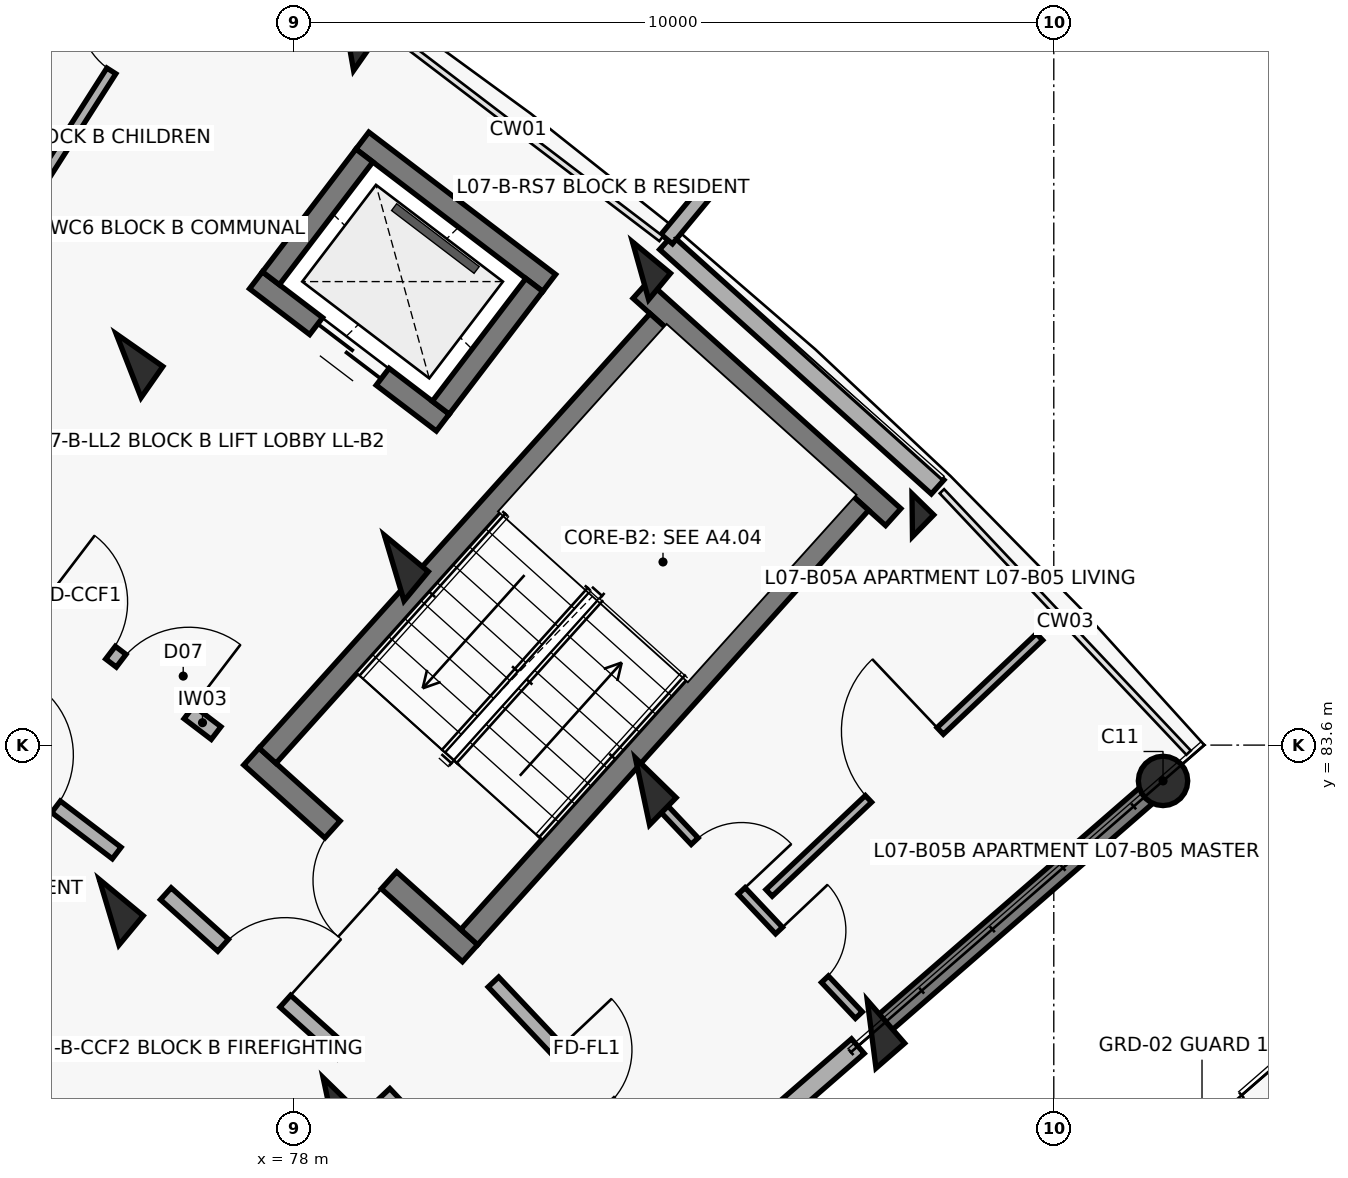
"""IFC4 building model, lengths in metres.
Left out: names, types, materials, properties, quantities, classifications, styles, units other than length and angle.
Written with IfcOpenShell. Run it as: python <this file> out.ifc"""

import sys

from ifc_helpers import new_model, si_unit, direction, frame, frame_2d, origin, origin_2d, place, context, subcontext, project, spatial, rectangle, circle, extrude, element, fill, save


model = new_model("IFC4")
c1 = context("Model", 3, precision=1e-05, world=origin(), true_north=direction((0.0, 1.0)))
c2 = subcontext(c1, "Body", "Model", "MODEL_VIEW")
j1 = project(units=[si_unit("LENGTHUNIT", "METRE"), si_unit("PLANEANGLEUNIT", "RADIAN")], contexts=[c1])
p1 = place(None, origin())
s1 = spatial("IfcSite", under=j1, at=p1, CompositionType="ELEMENT")
p2 = place(p1, origin())
s2 = spatial("IfcBuilding", under=s1, at=p2, CompositionType="ELEMENT")
p3 = place(p2, frame((0.0, 0.0, 23.6)))
s3 = spatial("IfcBuildingStorey", under=s2, at=p3, CompositionType="ELEMENT", Elevation=23.6)
p4 = place(p3, frame((75.828, 88.592, 0.0), z_axis=(0.0, 0.0, 1.0), x_axis=(0.573004420611, 0.819552276527, 0.0)))
e1 = element("IfcColumn", 1, at=p4, inside=s3, PredefinedType="COLUMN", context=c2, shape_type="SweptSolid", body=[
    extrude(rectangle(XDim=0.5, YDim=0.75, at=origin_2d()), origin(), (0.0, 0.0, 1.0), 3.1),
])
p5 = place(p3, frame((78.739, 92.755, 0.0), z_axis=(0.0, 0.0, 1.0), x_axis=(0.573004420611, 0.819552276527, 0.0)))
e2 = element("IfcColumn", 2, at=p5, inside=s3, PredefinedType="COLUMN", context=c2, shape_type="SweptSolid", body=[
    extrude(rectangle(XDim=0.4, YDim=0.4, at=origin_2d()), origin(), (0.0, 0.0, 1.0), 3.1),
])
for number, where, z_axis, x_axis in (
    (3, (75.571, 81.402, 0.0), (0.0, 0.0, 1.0), (0.638, 0.77, 0.0)),
    (4, (79.322, 85.93, 0.0), (0.0, 0.0, 1.0), (0.638, 0.77, 0.0)),
):
    element("IfcColumn", number, at=place(p3, frame(where, z_axis=z_axis, x_axis=x_axis)), inside=s3, PredefinedType="COLUMN", context=c2, shape_type="SweptSolid", body=[
        extrude(rectangle(XDim=0.5, YDim=0.75, at=origin_2d()), origin(), (0.0, 0.0, 1.0), 3.1),
    ])
p6 = place(p3, frame((82.563, 89.842, 0.0), z_axis=(0.0, 0.0, 1.0), x_axis=(0.637961754089, 0.770068049148, 0.0)))
e5 = element("IfcColumn", 5, at=p6, inside=s3, PredefinedType="COLUMN", context=c2, shape_type="SweptSolid", body=[
    extrude(rectangle(XDim=0.45, YDim=0.65, at=origin_2d()), origin(), (0.0, 0.0, 1.0), 3.1),
])
for number, where, z_axis, x_axis in (
    (6, (78.48, 78.784, 0.0), (0.0, 0.0, 1.0), (0.699, 0.715, 0.0)),
    (7, (82.588, 82.991, 0.0), (0.0, 0.0, 1.0), (0.699, 0.715, 0.0)),
):
    element("IfcColumn", number, at=place(p3, frame(where, z_axis=z_axis, x_axis=x_axis)), inside=s3, PredefinedType="COLUMN", context=c2, shape_type="SweptSolid", body=[
        extrude(rectangle(XDim=0.5, YDim=0.75, at=origin_2d()), origin(), (0.0, 0.0, 1.0), 3.1),
    ])
p7 = place(p3, frame((86.137, 86.626, 0.0), z_axis=(0.0, 0.0, 1.0), x_axis=(0.698665066769, 0.715448897181, 0.0)))
e8 = element("IfcColumn", 8, at=p7, inside=s3, PredefinedType="COLUMN", context=c2, shape_type="SweptSolid", body=[
    extrude(rectangle(XDim=0.4, YDim=0.4, at=origin_2d()), origin(), (0.0, 0.0, 1.0), 3.1),
])
p8 = place(p3, frame((85.603, 79.796, 0.0), z_axis=(0.0, 0.0, 1.0), x_axis=(0.754709580223, 0.656059028991, 0.0)))
e9 = element("IfcColumn", 9, at=p8, inside=s3, PredefinedType="COLUMN", context=c2, shape_type="SweptSolid", body=[
    extrude(rectangle(XDim=0.5, YDim=0.75, at=origin_2d()), origin(), (0.0, 0.0, 1.0), 3.1),
])
p9 = place(p3, frame((89.437, 83.129, 0.0), z_axis=(0.0, 0.0, 1.0), x_axis=(0.754709580223, 0.656059028991, 0.0)))
e10 = element("IfcColumn", 10, at=p9, inside=s3, PredefinedType="COLUMN", context=c2, shape_type="SweptSolid", body=[
    extrude(circle(Radius=0.325, at=origin_2d()), origin(), (0.0, 0.0, 1.0), 3.1),
])
p10 = place(p3, frame((85.739, 79.914, 0.0), z_axis=(0.0, 0.0, 1.0), x_axis=(0.754703505217, 0.65606601742, 0.0)))
e11 = element("IfcWall", 11, at=p10, inside=s3, PredefinedType="SHEAR", context=c2, shape_type="SweptSolid", body=[
    extrude(rectangle(XDim=4.72, YDim=0.27, at=frame_2d((2.36, 0.0))), origin(), (0.0, 0.0, 1.0), 2.86),
])
p11 = place(p3, frame((82.897, 90.213, 0.0), z_axis=(0.0, 0.0, 1.0), x_axis=(0.743387539862, -0.668860946369, 0.0)))
e12 = element("IfcWall", 12, at=p11, inside=s3, PredefinedType="SOLIDWALL", context=c2, shape_type="SweptSolid", body=[
    extrude(rectangle(XDim=4.809, YDim=0.248, at=frame_2d((2.405, 0.0))), origin(), (0.0, 0.0, 1.0), 2.25),
])
p12 = place(p3, frame((82.908, 90.257, 0.0), z_axis=(0.0, 0.0, 1.0), x_axis=(0.637967316825, 0.770063440674, 0.0)))
e13 = element("IfcWall", 13, at=p12, inside=s3, PredefinedType="PARAPET", context=c2, shape_type="SweptSolid", body=[
    extrude(rectangle(XDim=0.9, YDim=0.195, at=frame_2d((0.45, 0.0))), origin(), (0.0, 0.0, 1.0), 2.25),
])
p13 = place(p3, frame((79.234, 74.259, 0.0), z_axis=(0.0, 0.0, 1.0), x_axis=(0.754717680958, 0.656049710044, 0.0)))
e14 = element("IfcWall", 14, at=p13, inside=s3, PredefinedType="SOLIDWALL", context=c2, shape_type="SweptSolid", body=[
    extrude(rectangle(XDim=8.2, YDim=0.255, at=frame_2d((4.1, 0.0))), origin(), (0.0, 0.0, 1.0), 2.18),
])
p14 = place(p13, frame((3.59, 0.0, 0.75)))
e15 = element("IfcOpeningElement", 15, at=p14, cuts=e14, PredefinedType="OPENING", context=c2, shape_type="SweptSolid", body=[
    extrude(rectangle(XDim=1.35, YDim=1.35, at=frame_2d((0.675, 0.675))), frame((0.0, 0.137, 0.0), z_axis=(0.0, -1.0, 0.0), x_axis=(1.0, 0.0, 0.0)), (0.0, 0.0, 1.0), 0.275),
])
p15 = place(p3, frame((80.32, 80.862, 0.0), z_axis=(0.0, 0.0, 1.0), x_axis=(-0.743375696158, 0.668874109501, 0.0)))
e16 = element("IfcWall", 16, at=p15, inside=s3, PredefinedType="SHEAR", context=c2, shape_type="SweptSolid", body=[
    extrude(rectangle(XDim=3.87, YDim=0.3, at=frame_2d((1.935, 0.0))), origin(), (0.0, 0.0, 1.0), 3.1),
])
p16 = place(p15, frame((1.435, 0.0, 0.0)))
e17 = element("IfcOpeningElement", 17, at=p16, cuts=e16, PredefinedType="OPENING", context=c2, shape_type="SweptSolid", body=[
    extrude(rectangle(XDim=1.0, YDim=2.15, at=frame_2d((0.5, 1.075))), frame((0.0, 0.16, 0.0), z_axis=(0.0, -1.0, 0.0), x_axis=(1.0, 0.0, 0.0)), (0.0, 0.0, 1.0), 0.32),
])
p17 = place(p3, frame((85.887, 86.601, 0.0), z_axis=(0.0, 0.0, 1.0), x_axis=(-0.743400052815, 0.668847038922, 0.0)))
e18 = element("IfcWall", 18, at=p17, inside=s3, PredefinedType="SHEAR", context=c2, shape_type="SweptSolid", body=[
    extrude(rectangle(XDim=4.47, YDim=0.3, at=frame_2d((2.235, 0.0))), origin(), (0.0, 0.0, 1.0), 3.1),
])
p18 = place(p3, frame((80.309, 81.073, 0.0), z_axis=(0.0, 0.0, 1.0), x_axis=(0.668885797871, 0.743365179038, 0.0)))
e19 = element("IfcWall", 19, at=p18, inside=s3, PredefinedType="SHEAR", context=c2, shape_type="SweptSolid", body=[
    extrude(rectangle(XDim=7.69, YDim=0.3, at=frame_2d((3.845, 0.0))), origin(), (0.0, 0.0, 1.0), 3.1),
])
p19 = place(p3, frame((77.655, 83.461, 0.0), z_axis=(0.0, 0.0, 1.0), x_axis=(0.668868253964, 0.743380964808, 0.0)))
e20 = element("IfcWall", 20, at=p19, inside=s3, PredefinedType="SHEAR", context=c2, shape_type="SweptSolid", body=[
    extrude(rectangle(XDim=7.69, YDim=0.3, at=frame_2d((3.845, 0.0))), origin(), (0.0, 0.0, 1.0), 3.1),
])
p20 = place(p3, frame((79.961, 87.844, 0.0), z_axis=(0.0, 0.0, 1.0), x_axis=(-0.795464365424, 0.606000365793, 0.0)))
e21 = element("IfcWall", 21, at=p20, inside=s3, PredefinedType="SHEAR", context=c2, shape_type="SweptSolid", body=[
    extrude(rectangle(XDim=3.09, YDim=0.28, at=frame_2d((1.545, 0.0))), origin(), (0.0, 0.0, 1.0), 3.1),
])
p21 = place(p20, frame((0.995, 0.0, 0.0)))
e22 = element("IfcOpeningElement", 22, at=p21, cuts=e21, PredefinedType="OPENING", context=c2, shape_type="SweptSolid", body=[
    extrude(rectangle(XDim=1.1, YDim=2.15, at=frame_2d((0.55, 1.075))), frame((0.0, 0.15, 0.0), z_axis=(0.0, -1.0, 0.0), x_axis=(1.0, 0.0, 0.0)), (0.0, 0.0, 1.0), 0.3),
])
p22 = place(p3, frame((81.361, 89.681, 0.0), z_axis=(0.0, 0.0, 1.0), x_axis=(-0.795502452183, 0.605950368076, 0.0)))
e23 = element("IfcWall", 23, at=p22, inside=s3, PredefinedType="SHEAR", context=c2, shape_type="SweptSolid", body=[
    extrude(rectangle(XDim=3.09, YDim=0.28, at=frame_2d((1.545, 0.0))), origin(), (0.0, 0.0, 1.0), 3.1),
])
for number, where, z_axis, x_axis in (
    (24, (79.935, 88.04, 0.0), (0.0, 0.0, 1.0), (0.606, 0.795, 0.0)),
    (25, (77.699, 89.743, 0.0), (0.0, 0.0, 1.0), (0.606, 0.795, 0.0)),
):
    element("IfcWall", number, at=place(p3, frame(where, z_axis=z_axis, x_axis=x_axis)), inside=s3, PredefinedType="SHEAR", context=c2, shape_type="SweptSolid", body=[
        extrude(rectangle(XDim=2.03, YDim=0.28, at=frame_2d((1.015, 0.0))), origin(), (0.0, 0.0, 1.0), 3.1),
    ])
p23 = place(p3, frame((72.347, 87.37, 0.0), z_axis=(0.0, 0.0, 1.0), x_axis=(0.537777309481, 0.843086926365, 0.0)))
e26 = element("IfcWall", 26, at=p23, inside=s3, PredefinedType="PARTITIONING", context=c2, shape_type="SweptSolid", body=[
    extrude(rectangle(XDim=7.95, YDim=0.14, at=frame_2d((3.975, 0.0))), origin(), (0.0, 0.0, 1.0), 2.08),
])
p24 = place(p23, frame((6.05, 0.0, 0.0)))
e27 = element("IfcOpeningElement", 27, at=p24, cuts=e26, PredefinedType="OPENING", context=c2, shape_type="SweptSolid", body=[
    extrude(rectangle(XDim=0.92, YDim=2.1, at=frame_2d((0.46, 1.05))), frame((0.0, 0.08, 0.0), z_axis=(0.0, -1.0, 0.0), x_axis=(1.0, 0.0, 0.0)), (0.0, 0.0, 1.0), 0.16),
])
p25 = place(p3, frame((74.357, 85.756, 0.0), z_axis=(0.0, 0.0, 1.0), x_axis=(0.795498026433, -0.605956178235, 0.0)))
e28 = element("IfcWall", 28, at=p25, inside=s3, PredefinedType="SOLIDWALL", context=c2, shape_type="SweptSolid", body=[
    extrude(rectangle(XDim=3.296, YDim=0.21, at=frame_2d((1.648, 0.0))), origin(), (0.0, 0.0, 1.0), 2.08),
])
p26 = place(p25, frame((0.45, 0.0, 0.0)))
e29 = element("IfcOpeningElement", 29, at=p26, cuts=e28, PredefinedType="OPENING", context=c2, shape_type="SweptSolid", body=[
    extrude(rectangle(XDim=1.1, YDim=2.15, at=frame_2d((0.55, 1.075))), frame((0.0, 0.115, 0.0), z_axis=(0.0, -1.0, 0.0), x_axis=(1.0, 0.0, 0.0)), (0.0, 0.0, 1.0), 0.23),
])
p27 = place(p25, frame((1.726, 0.0, 0.0)))
e30 = element("IfcOpeningElement", 30, at=p27, cuts=e28, PredefinedType="OPENING", context=c2, shape_type="SweptSolid", body=[
    extrude(rectangle(XDim=1.12, YDim=2.15, at=frame_2d((0.56, 1.075))), frame((0.0, 0.115, 0.0), z_axis=(0.0, -1.0, 0.0), x_axis=(1.0, 0.0, 0.0)), (0.0, 0.0, 1.0), 0.23),
])
p28 = place(p3, frame((73.182, 84.076, 0.0), z_axis=(0.0, 0.0, 1.0), x_axis=(0.795501577908, -0.605951515838, 0.0)))
e31 = element("IfcWall", 31, at=p28, inside=s3, PredefinedType="SOLIDWALL", context=c2, shape_type="SweptSolid", body=[
    extrude(rectangle(XDim=3.129, YDim=0.19, at=frame_2d((1.564, 0.0))), origin(), (0.0, 0.0, 1.0), 2.08),
])
p29 = place(p28, frame((1.004, 0.0, 0.0)))
e32 = element("IfcOpeningElement", 32, at=p29, cuts=e31, PredefinedType="OPENING", context=c2, shape_type="SweptSolid", body=[
    extrude(rectangle(XDim=1.12, YDim=2.15, at=frame_2d((0.56, 1.075))), frame((0.0, 0.105, 0.0), z_axis=(0.0, -1.0, 0.0), x_axis=(1.0, 0.0, 0.0)), (0.0, 0.0, 1.0), 0.21),
])
p30 = place(p3, frame((76.317, 81.644, 0.0), z_axis=(0.0, 0.0, 1.0), x_axis=(0.743387266925, -0.668861249718, 0.0)))
e33 = element("IfcWall", 33, at=p30, inside=s3, PredefinedType="SOLIDWALL", context=c2, shape_type="SweptSolid", body=[
    extrude(rectangle(XDim=3.128, YDim=0.21, at=frame_2d((1.564, 0.0))), origin(), (0.0, 0.0, 1.0), 2.08),
])
p31 = place(p30, frame((1.014, 0.0, 0.0)))
e34 = element("IfcOpeningElement", 34, at=p31, cuts=e33, PredefinedType="OPENING", context=c2, shape_type="SweptSolid", body=[
    extrude(rectangle(XDim=1.1, YDim=2.15, at=frame_2d((0.55, 1.075))), frame((0.0, 0.115, 0.0), z_axis=(0.0, -1.0, 0.0), x_axis=(1.0, 0.0, 0.0)), (0.0, 0.0, 1.0), 0.23),
])
p32 = place(p3, frame((80.628, 80.483, 0.0), z_axis=(0.0, 0.0, 1.0), x_axis=(0.686310507227, -0.727308660522, 0.0)))
e35 = element("IfcWall", 35, at=p32, inside=s3, PredefinedType="SOLIDWALL", context=c2, shape_type="SweptSolid", body=[
    extrude(rectangle(XDim=3.436, YDim=0.19, at=frame_2d((1.718, 0.0))), origin(), (0.0, 0.0, 1.0), 2.08),
])
p33 = place(p32, frame((1.228, 0.0, 0.0)))
e36 = element("IfcOpeningElement", 36, at=p33, cuts=e35, PredefinedType="OPENING", context=c2, shape_type="SweptSolid", body=[
    extrude(rectangle(XDim=0.98, YDim=2.15, at=frame_2d((0.49, 1.075))), frame((0.0, 0.105, 0.0), z_axis=(0.0, -1.0, 0.0), x_axis=(1.0, 0.0, 0.0)), (0.0, 0.0, 1.0), 0.21),
])
p34 = place(p3, frame((79.195, 79.016, 0.0), z_axis=(0.0, 0.0, 1.0), x_axis=(0.686307658735, -0.727311348434, 0.0)))
e37 = element("IfcWall", 37, at=p34, inside=s3, PredefinedType="SOLIDWALL", context=c2, shape_type="SweptSolid", body=[
    extrude(rectangle(XDim=3.269, YDim=0.19, at=frame_2d((1.634, 0.0))), origin(), (0.0, 0.0, 1.0), 2.08),
])
p35 = place(p34, frame((1.184, 0.0, 0.0)))
e38 = element("IfcOpeningElement", 38, at=p35, cuts=e37, PredefinedType="OPENING", context=c2, shape_type="SweptSolid", body=[
    extrude(rectangle(XDim=0.9, YDim=2.1, at=frame_2d((0.45, 1.05))), frame((0.0, 0.105, 0.0), z_axis=(0.0, -1.0, 0.0), x_axis=(1.0, 0.0, 0.0)), (0.0, 0.0, 1.0), 0.21),
])
p36 = place(p3, frame((82.829, 82.809, 0.0), z_axis=(0.0, 0.0, 1.0), x_axis=(0.686300649561, -0.727317962388, 0.0)))
e39 = element("IfcWall", 39, at=p36, inside=s3, PredefinedType="PARTITIONING", context=c2, shape_type="SweptSolid", body=[
    extrude(rectangle(XDim=3.797, YDim=0.125, at=frame_2d((1.899, 0.0))), origin(), (0.0, 0.0, 1.0), 2.08),
])
p37 = place(p36, frame((0.65, 0.0, 0.0)))
e40 = element("IfcOpeningElement", 40, at=p37, cuts=e39, PredefinedType="OPENING", context=c2, shape_type="SweptSolid", body=[
    extrude(rectangle(XDim=0.9, YDim=2.1, at=frame_2d((0.45, 1.05))), frame((0.0, 0.073, 0.0), z_axis=(0.0, -1.0, 0.0), x_axis=(1.0, 0.0, 0.0)), (0.0, 0.0, 1.0), 0.145),
])
p38 = place(p36, frame((2.267, 0.0, 0.0)))
e41 = element("IfcOpeningElement", 41, at=p38, cuts=e39, PredefinedType="OPENING", context=c2, shape_type="SweptSolid", body=[
    extrude(rectangle(XDim=0.88, YDim=2.1, at=frame_2d((0.44, 1.05))), frame((0.0, 0.073, 0.0), z_axis=(0.0, -1.0, 0.0), x_axis=(1.0, 0.0, 0.0)), (0.0, 0.0, 1.0), 0.145),
])
p39 = place(p3, frame((84.254, 81.655, 0.0), z_axis=(0.0, 0.0, 1.0), x_axis=(0.726295620759, 0.687382478149, 0.0)))
e42 = element("IfcWall", 42, at=p39, inside=s3, PredefinedType="PARTITIONING", context=c2, shape_type="SweptSolid", body=[
    extrude(rectangle(XDim=4.9, YDim=0.12, at=frame_2d((2.45, 0.0))), origin(), (0.0, 0.0, 1.0), 2.08),
])
p40 = place(p39, frame((1.8, 0.0, 0.0)))
e43 = element("IfcOpeningElement", 43, at=p40, cuts=e42, PredefinedType="OPENING", context=c2, shape_type="SweptSolid", body=[
    extrude(rectangle(XDim=1.3, YDim=2.1, at=frame_2d((0.65, 1.05))), frame((0.0, 0.07, 0.0), z_axis=(0.0, -1.0, 0.0), x_axis=(1.0, 0.0, 0.0)), (0.0, 0.0, 1.0), 0.14),
])
p41 = place(p16, origin())
e44 = element("IfcDoor", 44, at=p41, inside=s3, OperationType="SINGLE_SWING_LEFT", PredefinedType="DOOR", context=c2, shape_type="SweptSolid", body=[
    extrude(rectangle(XDim=1.0, YDim=2.15, at=frame_2d((0.5, 1.075))), frame((0.0, 0.025, 0.0), z_axis=(0.0, -1.0, 0.0), x_axis=(1.0, 0.0, 0.0)), (0.0, 0.0, 1.0), 0.05),
])
fill(e17, e44)
p42 = place(p21, origin())
e45 = element("IfcDoor", 45, at=p42, inside=s3, OperationType="DOUBLE_DOOR_SLIDING", PredefinedType="DOOR", context=c2, shape_type="SweptSolid", body=[
    extrude(rectangle(XDim=1.1, YDim=2.15, at=frame_2d((0.55, 1.075))), frame((0.0, 0.025, 0.0), z_axis=(0.0, -1.0, 0.0), x_axis=(1.0, 0.0, 0.0)), (0.0, 0.0, 1.0), 0.05),
])
fill(e22, e45)
p43 = place(p24, origin())
e46 = element("IfcDoor", 46, at=p43, inside=s3, OperationType="SINGLE_SWING_RIGHT", PredefinedType="DOOR", context=c2, shape_type="SweptSolid", body=[
    extrude(rectangle(XDim=0.92, YDim=2.1, at=frame_2d((0.46, 1.05))), frame((0.0, 0.025, 0.0), z_axis=(0.0, -1.0, 0.0), x_axis=(1.0, 0.0, 0.0)), (0.0, 0.0, 1.0), 0.05),
])
fill(e27, e46)
p44 = place(p26, origin())
e47 = element("IfcDoor", 47, at=p44, inside=s3, OperationType="SINGLE_SWING_LEFT", PredefinedType="DOOR", context=c2, shape_type="SweptSolid", body=[
    extrude(rectangle(XDim=1.1, YDim=2.15, at=frame_2d((0.55, 1.075))), frame((0.0, 0.025, 0.0), z_axis=(0.0, -1.0, 0.0), x_axis=(1.0, 0.0, 0.0)), (0.0, 0.0, 1.0), 0.05),
])
fill(e29, e47)
p45 = place(p27, origin())
e48 = element("IfcDoor", 48, at=p45, inside=s3, OperationType="SINGLE_SWING_RIGHT", PredefinedType="DOOR", context=c2, shape_type="SweptSolid", body=[
    extrude(rectangle(XDim=1.12, YDim=2.15, at=frame_2d((0.56, 1.075))), frame((0.0, 0.025, 0.0), z_axis=(0.0, -1.0, 0.0), x_axis=(1.0, 0.0, 0.0)), (0.0, 0.0, 1.0), 0.05),
])
fill(e30, e48)
p46 = place(p29, origin())
e49 = element("IfcDoor", 49, at=p46, inside=s3, OperationType="SINGLE_SWING_LEFT", PredefinedType="DOOR", context=c2, shape_type="SweptSolid", body=[
    extrude(rectangle(XDim=1.12, YDim=2.15, at=frame_2d((0.56, 1.075))), frame((0.0, 0.025, 0.0), z_axis=(0.0, -1.0, 0.0), x_axis=(1.0, 0.0, 0.0)), (0.0, 0.0, 1.0), 0.05),
])
fill(e32, e49)
p47 = place(p31, origin())
e50 = element("IfcDoor", 50, at=p47, inside=s3, OperationType="SINGLE_SWING_RIGHT", PredefinedType="DOOR", context=c2, shape_type="SweptSolid", body=[
    extrude(rectangle(XDim=1.1, YDim=2.15, at=frame_2d((0.55, 1.075))), frame((0.0, 0.025, 0.0), z_axis=(0.0, -1.0, 0.0), x_axis=(1.0, 0.0, 0.0)), (0.0, 0.0, 1.0), 0.05),
])
fill(e34, e50)
p48 = place(p33, origin())
e51 = element("IfcDoor", 51, at=p48, inside=s3, OperationType="SINGLE_SWING_LEFT", PredefinedType="DOOR", context=c2, shape_type="SweptSolid", body=[
    extrude(rectangle(XDim=0.98, YDim=2.15, at=frame_2d((0.49, 1.075))), frame((0.0, 0.025, 0.0), z_axis=(0.0, -1.0, 0.0), x_axis=(1.0, 0.0, 0.0)), (0.0, 0.0, 1.0), 0.05),
])
fill(e36, e51)
p49 = place(p37, origin())
e52 = element("IfcDoor", 52, at=p49, inside=s3, OperationType="SINGLE_SWING_RIGHT", PredefinedType="DOOR", context=c2, shape_type="SweptSolid", body=[
    extrude(rectangle(XDim=0.9, YDim=2.1, at=frame_2d((0.45, 1.05))), frame((0.0, 0.025, 0.0), z_axis=(0.0, -1.0, 0.0), x_axis=(1.0, 0.0, 0.0)), (0.0, 0.0, 1.0), 0.05),
])
fill(e40, e52)
p50 = place(p38, origin())
e53 = element("IfcDoor", 53, at=p50, inside=s3, OperationType="SINGLE_SWING_LEFT", PredefinedType="DOOR", context=c2, shape_type="SweptSolid", body=[
    extrude(rectangle(XDim=0.88, YDim=2.1, at=frame_2d((0.44, 1.05))), frame((0.0, 0.025, 0.0), z_axis=(0.0, -1.0, 0.0), x_axis=(1.0, 0.0, 0.0)), (0.0, 0.0, 1.0), 0.05),
])
fill(e41, e53)
p51 = place(p40, origin())
e54 = element("IfcDoor", 54, at=p51, inside=s3, OperationType="SINGLE_SWING_RIGHT", PredefinedType="DOOR", context=c2, shape_type="SweptSolid", body=[
    extrude(rectangle(XDim=1.3, YDim=2.1, at=frame_2d((0.65, 1.05))), frame((0.0, 0.025, 0.0), z_axis=(0.0, -1.0, 0.0), x_axis=(1.0, 0.0, 0.0)), (0.0, 0.0, 1.0), 0.05),
])
fill(e43, e54)
save(model, sys.argv[1])
